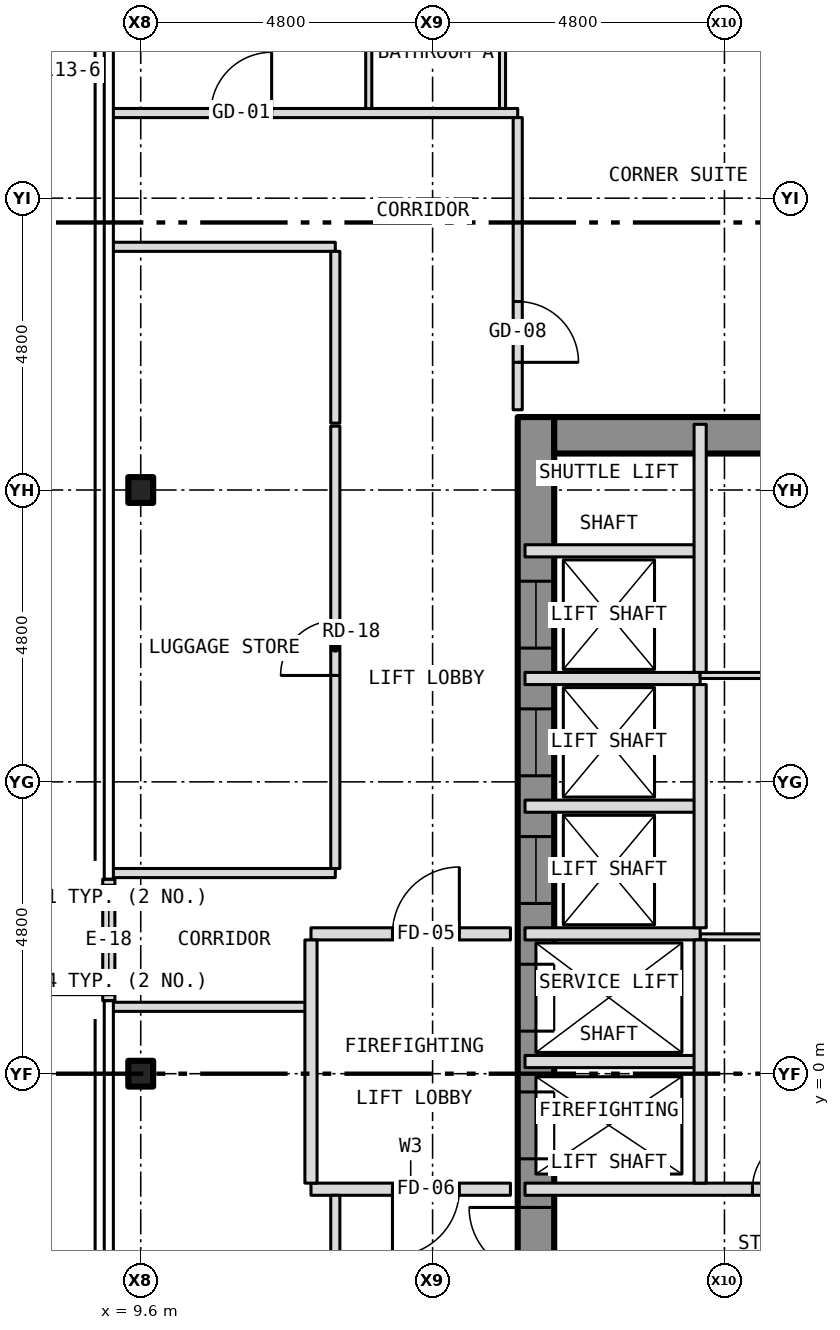
"""IFC4 building model, lengths in metres.
Left out: names, types, materials, properties, quantities, classifications, styles, units other than length and angle.
Written with IfcOpenShell. Run it as: python <this file> out.ifc"""

import sys

from ifc_helpers import new_model, si_unit, direction, frame, frame_2d, origin, origin_2d, place, context, subcontext, project, spatial, rectangle, i_section, extrude, element, fill, save


model = new_model("IFC4")
c1 = context("Model", 3, precision=1e-05, world=origin(), true_north=direction((0.0, 1.0)))
c2 = subcontext(c1, "Body", "Model", "MODEL_VIEW")
j1 = project(units=[si_unit("LENGTHUNIT", "METRE"), si_unit("PLANEANGLEUNIT", "RADIAN")], contexts=[c1])
p1 = place(None, origin())
s1 = spatial("IfcSite", under=j1, at=p1, CompositionType="ELEMENT")
p2 = place(p1, origin())
s2 = spatial("IfcBuilding", under=s1, at=p2, CompositionType="ELEMENT")
p3 = place(p2, frame((0.0, 0.0, 60.0)))
s3 = spatial("IfcBuildingStorey", under=s2, at=p3, CompositionType="ELEMENT", Elevation=60.0)
for number, where, z_axis, x_axis in (
    (1, (9.6, 0.0, -0.15), (0.0, 0.0, 1.0), (1.0, 0.0, 0.0)),
    (2, (9.6, 9.6, -0.15), (0.0, 0.0, 1.0), (1.0, 0.0, 0.0)),
):
    element("IfcColumn", number, at=place(p3, frame(where, z_axis=z_axis, x_axis=x_axis)), inside=s3, PredefinedType="COLUMN", context=c2, shape_type="SweptSolid", body=[
        extrude(i_section(OverallWidth=0.409, OverallDepth=0.424, WebThickness=0.033, FlangeThickness=0.052, at=origin_2d()), origin(), (0.0, 0.0, 1.0), 3.5),
    ])
p4 = place(p3, frame((16.1, -10.8, 0.0), z_axis=(0.0, 0.0, 1.0), x_axis=(0.0, 1.0, 0.0)))
e3 = element("IfcWall", 3, at=p4, inside=s3, PredefinedType="SHEAR", context=c2, shape_type="SweptSolid", body=[
    extrude(rectangle(XDim=21.6, YDim=0.6, at=frame_2d((10.8, 0.0))), origin(), (0.0, 0.0, 1.0), 3.25),
])
p5 = place(p4, frame((9.4, 0.0, 0.0)))
e4 = element("IfcOpeningElement", 4, at=p5, cuts=e3, PredefinedType="OPENING", context=c2, shape_type="SweptSolid", body=[
    extrude(rectangle(XDim=1.1, YDim=2.1, at=frame_2d((0.55, 1.05))), frame((0.0, 0.312, 0.0), z_axis=(0.0, -1.0, 0.0), x_axis=(1.0, 0.0, 0.0)), (0.0, 0.0, 1.0), 0.624),
])
p6 = place(p4, frame((11.5, 0.0, 0.0)))
e5 = element("IfcOpeningElement", 5, at=p6, cuts=e3, PredefinedType="OPENING", context=c2, shape_type="SweptSolid", body=[
    extrude(rectangle(XDim=1.1, YDim=2.1, at=frame_2d((0.55, 1.05))), frame((0.0, 0.312, 0.0), z_axis=(0.0, -1.0, 0.0), x_axis=(1.0, 0.0, 0.0)), (0.0, 0.0, 1.0), 0.624),
])
p7 = place(p4, frame((13.6, 0.0, 0.0)))
e6 = element("IfcOpeningElement", 6, at=p7, cuts=e3, PredefinedType="OPENING", context=c2, shape_type="SweptSolid", body=[
    extrude(rectangle(XDim=1.1, YDim=2.1, at=frame_2d((0.55, 1.05))), frame((0.0, 0.312, 0.0), z_axis=(0.0, -1.0, 0.0), x_axis=(1.0, 0.0, 0.0)), (0.0, 0.0, 1.0), 0.624),
])
p8 = place(p4, frame((15.7, 0.0, 0.0)))
e7 = element("IfcOpeningElement", 7, at=p8, cuts=e3, PredefinedType="OPENING", context=c2, shape_type="SweptSolid", body=[
    extrude(rectangle(XDim=1.1, YDim=2.1, at=frame_2d((0.55, 1.05))), frame((0.0, 0.312, 0.0), z_axis=(0.0, -1.0, 0.0), x_axis=(1.0, 0.0, 0.0)), (0.0, 0.0, 1.0), 0.624),
])
p9 = place(p4, frame((17.8, 0.0, 0.0)))
e8 = element("IfcOpeningElement", 8, at=p9, cuts=e3, PredefinedType="OPENING", context=c2, shape_type="SweptSolid", body=[
    extrude(rectangle(XDim=1.1, YDim=2.1, at=frame_2d((0.55, 1.05))), frame((0.0, 0.312, 0.0), z_axis=(0.0, -1.0, 0.0), x_axis=(1.0, 0.0, 0.0)), (0.0, 0.0, 1.0), 0.624),
])
p10 = place(p4, frame((5.642, 0.0, 0.0)))
e9 = element("IfcOpeningElement", 9, at=p10, cuts=e3, PredefinedType="OPENING", context=c2, shape_type="SweptSolid", body=[
    extrude(rectangle(XDim=1.1, YDim=2.1, at=frame_2d((0.55, 1.05))), frame((0.0, 0.312, 0.0), z_axis=(0.0, -1.0, 0.0), x_axis=(1.0, 0.0, 0.0)), (0.0, 0.0, 1.0), 0.624),
])
p11 = place(p4, frame((7.5, 0.0, 0.0)))
e10 = element("IfcOpeningElement", 10, at=p11, cuts=e3, PredefinedType="OPENING", context=c2, shape_type="SweptSolid", body=[
    extrude(rectangle(XDim=1.1, YDim=2.1, at=frame_2d((0.55, 1.05))), frame((0.0, 0.312, 0.0), z_axis=(0.0, -1.0, 0.0), x_axis=(1.0, 0.0, 0.0)), (0.0, 0.0, 1.0), 0.624),
])
p12 = place(p3, frame((16.4, 10.5, 0.0), z_axis=(0.0, 0.0, 1.0), x_axis=(1.0, 0.0, 0.0)))
e11 = element("IfcWall", 11, at=p12, inside=s3, PredefinedType="SHEAR", context=c2, shape_type="SweptSolid", body=[
    extrude(rectangle(XDim=7.0, YDim=0.6, at=frame_2d((3.5, 0.0))), origin(), (0.0, 0.0, 1.0), 3.25),
])
p13 = place(p3, frame((9.075, 1.2, 0.0), z_axis=(0.0, 0.0, 1.0), x_axis=(0.0, 1.0, 0.0)))
e12 = element("IfcWall", 12, at=p13, inside=s3, PredefinedType="SOLIDWALL", context=c2, shape_type="SweptSolid", body=[
    extrude(rectangle(XDim=2.0, YDim=0.2, at=frame_2d((1.0, 0.0))), origin(), (0.0, 0.0, 1.0), 2.593),
])
p14 = place(p13, frame((0.1, 0.0, 0.0)))
e13 = element("IfcOpeningElement", 13, at=p14, cuts=e12, PredefinedType="OPENING", context=c2, shape_type="SweptSolid", body=[
    extrude(rectangle(XDim=1.8, YDim=2.1, at=frame_2d((0.9, 1.05))), frame((0.0, 0.112, 0.0), z_axis=(0.0, -1.0, 0.0), x_axis=(1.0, 0.0, 0.0)), (0.0, 0.0, 1.0), 0.224),
])
p15 = place(p3, frame((12.4, -1.9, 0.0), z_axis=(0.0, 0.0, 1.0), x_axis=(1.0, 0.0, 0.0)))
e14 = element("IfcWall", 14, at=p15, inside=s3, PredefinedType="PARTITIONING", context=c2, shape_type="SweptSolid", body=[
    extrude(rectangle(XDim=3.28, YDim=0.2, at=frame_2d((1.64, 0.0))), origin(), (0.0, 0.0, 1.0), 3.35),
])
p16 = place(p15, frame((1.34, 0.0, 0.0)))
e15 = element("IfcOpeningElement", 15, at=p16, cuts=e14, PredefinedType="OPENING", context=c2, shape_type="SweptSolid", body=[
    extrude(rectangle(XDim=1.1, YDim=2.1, at=frame_2d((0.55, 1.05))), frame((0.0, 0.112, 0.0), z_axis=(0.0, -1.0, 0.0), x_axis=(1.0, 0.0, 0.0)), (0.0, 0.0, 1.0), 0.224),
])
p17 = place(p3, frame((15.92, -1.9, 0.0), z_axis=(0.0, 0.0, 1.0), x_axis=(1.0, 0.0, 0.0)))
e16 = element("IfcWall", 16, at=p17, inside=s3, PredefinedType="PARTITIONING", context=c2, shape_type="SweptSolid", body=[
    extrude(rectangle(XDim=7.96, YDim=0.2, at=frame_2d((3.98, 0.0))), origin(), (0.0, 0.0, 1.0), 3.25),
])
p18 = place(p17, frame((3.74, 0.0, 0.0)))
e17 = element("IfcOpeningElement", 17, at=p18, cuts=e16, PredefinedType="OPENING", context=c2, shape_type="SweptSolid", body=[
    extrude(rectangle(XDim=0.9, YDim=2.1, at=frame_2d((0.45, 1.05))), frame((0.0, 0.112, 0.0), z_axis=(0.0, -1.0, 0.0), x_axis=(1.0, 0.0, 0.0)), (0.0, 0.0, 1.0), 0.224),
])
p19 = place(p3, frame((15.92, 0.2, 0.0), z_axis=(0.0, 0.0, 1.0), x_axis=(1.0, 0.0, 0.0)))
e18 = element("IfcWall", 18, at=p19, inside=s3, PredefinedType="PARTITIONING", context=c2, shape_type="SweptSolid", body=[
    extrude(rectangle(XDim=2.88, YDim=0.2, at=frame_2d((1.44, 0.0))), origin(), (0.0, 0.0, 1.0), 3.25),
])
p20 = place(p3, frame((9.12, 1.1, 0.0), z_axis=(0.0, 0.0, 1.0), x_axis=(1.0, 0.0, 0.0)))
e19 = element("IfcWall", 19, at=p20, inside=s3, PredefinedType="PARTITIONING", context=c2, shape_type="SweptSolid", body=[
    extrude(rectangle(XDim=3.28, YDim=0.15, at=frame_2d((1.64, 0.0))), origin(), (0.0, 0.0, 1.0), 3.35),
])
p21 = place(p3, frame((18.8, 2.25, 0.0), z_axis=(0.0, 0.0, 1.0), x_axis=(1.0, 0.0, 0.0)))
e20 = element("IfcWall", 20, at=p21, inside=s3, PredefinedType="PARTITIONING", context=c2, shape_type="SweptSolid", body=[
    extrude(rectangle(XDim=5.08, YDim=0.1, at=frame_2d((2.54, 0.0))), origin(), (0.0, 0.0, 1.0), 3.25),
])
p22 = place(p21, frame((2.15, 0.0, 0.0)))
e21 = element("IfcOpeningElement", 21, at=p22, cuts=e20, PredefinedType="OPENING", context=c2, shape_type="SweptSolid", body=[
    extrude(rectangle(XDim=0.9, YDim=2.1, at=frame_2d((0.45, 1.05))), frame((0.0, 0.062, 0.0), z_axis=(0.0, -1.0, 0.0), x_axis=(1.0, 0.0, 0.0)), (0.0, 0.0, 1.0), 0.124),
])
p23 = place(p3, frame((12.4, 2.3, 0.0), z_axis=(0.0, 0.0, 1.0), x_axis=(1.0, 0.0, 0.0)))
e22 = element("IfcWall", 22, at=p23, inside=s3, PredefinedType="PARTITIONING", context=c2, shape_type="SweptSolid", body=[
    extrude(rectangle(XDim=3.28, YDim=0.2, at=frame_2d((1.64, 0.0))), origin(), (0.0, 0.0, 1.0), 3.35),
])
p24 = place(p23, frame((1.34, 0.0, 0.0)))
e23 = element("IfcOpeningElement", 23, at=p24, cuts=e22, PredefinedType="OPENING", context=c2, shape_type="SweptSolid", body=[
    extrude(rectangle(XDim=1.1, YDim=2.1, at=frame_2d((0.55, 1.05))), frame((0.0, 0.112, 0.0), z_axis=(0.0, -1.0, 0.0), x_axis=(1.0, 0.0, 0.0)), (0.0, 0.0, 1.0), 0.224),
])
p25 = place(p3, frame((15.92, 2.3, 0.0), z_axis=(0.0, 0.0, 1.0), x_axis=(1.0, 0.0, 0.0)))
e24 = element("IfcWall", 24, at=p25, inside=s3, PredefinedType="PARTITIONING", context=c2, shape_type="SweptSolid", body=[
    extrude(rectangle(XDim=2.88, YDim=0.2, at=frame_2d((1.44, 0.0))), origin(), (0.0, 0.0, 1.0), 3.25),
])
p26 = place(p3, frame((9.12, 3.3, 0.0), z_axis=(0.0, 0.0, 1.0), x_axis=(1.0, 0.0, 0.0)))
e25 = element("IfcWall", 25, at=p26, inside=s3, PredefinedType="PARTITIONING", context=c2, shape_type="SweptSolid", body=[
    extrude(rectangle(XDim=3.68, YDim=0.15, at=frame_2d((1.84, 0.0))), origin(), (0.0, 0.0, 1.0), 3.35),
])
for number, where, z_axis, x_axis in (
    (26, (15.92, 4.4, 0.0), (0.0, 0.0, 1.0), (1.0, 0.0, 0.0)),
    (27, (15.92, 6.5, 0.0), (0.0, 0.0, 1.0), (1.0, 0.0, 0.0)),
):
    element("IfcWall", number, at=place(p3, frame(where, z_axis=z_axis, x_axis=x_axis)), inside=s3, PredefinedType="PARTITIONING", context=c2, shape_type="SweptSolid", body=[
        extrude(rectangle(XDim=2.88, YDim=0.2, at=frame_2d((1.44, 0.0))), origin(), (0.0, 0.0, 1.0), 3.25),
    ])
p27 = place(p3, frame((18.8, 6.55, 0.0), z_axis=(0.0, 0.0, 1.0), x_axis=(1.0, 0.0, 0.0)))
e28 = element("IfcWall", 28, at=p27, inside=s3, PredefinedType="PARTITIONING", context=c2, shape_type="SweptSolid", body=[
    extrude(rectangle(XDim=5.08, YDim=0.1, at=frame_2d((2.54, 0.0))), origin(), (0.0, 0.0, 1.0), 3.25),
])
p28 = place(p27, frame((2.15, 0.0, 0.0)))
e29 = element("IfcOpeningElement", 29, at=p28, cuts=e28, PredefinedType="OPENING", context=c2, shape_type="SweptSolid", body=[
    extrude(rectangle(XDim=0.9, YDim=2.1, at=frame_2d((0.45, 1.05))), frame((0.0, 0.062, 0.0), z_axis=(0.0, -1.0, 0.0), x_axis=(1.0, 0.0, 0.0)), (0.0, 0.0, 1.0), 0.124),
])
p29 = place(p3, frame((15.92, 8.6, 0.0), z_axis=(0.0, 0.0, 1.0), x_axis=(1.0, 0.0, 0.0)))
e30 = element("IfcWall", 30, at=p29, inside=s3, PredefinedType="PARTITIONING", context=c2, shape_type="SweptSolid", body=[
    extrude(rectangle(XDim=2.88, YDim=0.2, at=frame_2d((1.44, 0.0))), origin(), (0.0, 0.0, 1.0), 3.25),
])
p30 = place(p3, frame((9.12, 13.6, 0.0), z_axis=(0.0, 0.0, 1.0), x_axis=(1.0, 0.0, 0.0)))
e31 = element("IfcWall", 31, at=p30, inside=s3, PredefinedType="PARTITIONING", context=c2, shape_type="SweptSolid", body=[
    extrude(rectangle(XDim=3.68, YDim=0.15, at=frame_2d((1.84, 0.0))), origin(), (0.0, 0.0, 1.0), 3.35),
])
p31 = place(p3, frame((9.12, 15.8, 0.0), z_axis=(0.0, 0.0, 1.0), x_axis=(1.0, 0.0, 0.0)))
e32 = element("IfcWall", 32, at=p31, inside=s3, PredefinedType="PARTITIONING", context=c2, shape_type="SweptSolid", body=[
    extrude(rectangle(XDim=6.68, YDim=0.15, at=frame_2d((3.34, 0.0))), origin(), (0.0, 0.0, 1.0), 3.35),
])
p32 = place(p31, frame((1.633, 0.0, 0.0)))
e33 = element("IfcOpeningElement", 33, at=p32, cuts=e32, PredefinedType="OPENING", context=c2, shape_type="SweptSolid", body=[
    extrude(rectangle(XDim=1.0, YDim=2.1, at=frame_2d((0.5, 1.05))), frame((0.0, 0.087, 0.0), z_axis=(0.0, -1.0, 0.0), x_axis=(1.0, 0.0, 0.0)), (0.0, 0.0, 1.0), 0.174),
])
p33 = place(p3, frame((12.4, -1.8, 0.0), z_axis=(0.0, 0.0, 1.0), x_axis=(0.0, 1.0, 0.0)))
e34 = element("IfcWall", 34, at=p33, inside=s3, PredefinedType="PARTITIONING", context=c2, shape_type="SweptSolid", body=[
    extrude(rectangle(XDim=4.0, YDim=0.2, at=frame_2d((2.0, 0.0))), origin(), (0.0, 0.0, 1.0), 3.35),
])
p34 = place(p3, frame((12.8, -13.525, 0.0), z_axis=(0.0, 0.0, 1.0), x_axis=(0.0, 1.0, 0.0)))
e35 = element("IfcWall", 35, at=p34, inside=s3, PredefinedType="PARTITIONING", context=c2, shape_type="SweptSolid", body=[
    extrude(rectangle(XDim=11.525, YDim=0.15, at=frame_2d((5.762, 0.0))), origin(), (0.0, 0.0, 1.0), 3.35),
])
p35 = place(p34, frame((0.875, 0.0, 0.0)))
e36 = element("IfcOpeningElement", 36, at=p35, cuts=e35, PredefinedType="OPENING", context=c2, shape_type="SweptSolid", body=[
    extrude(rectangle(XDim=0.9, YDim=2.1, at=frame_2d((0.45, 1.05))), frame((0.0, 0.087, 0.0), z_axis=(0.0, -1.0, 0.0), x_axis=(1.0, 0.0, 0.0)), (0.0, 0.0, 1.0), 0.174),
])
p36 = place(p34, frame((7.325, 0.0, 0.0)))
e37 = element("IfcOpeningElement", 37, at=p36, cuts=e35, PredefinedType="OPENING", context=c2, shape_type="SweptSolid", body=[
    extrude(rectangle(XDim=0.9, YDim=2.1, at=frame_2d((0.45, 1.05))), frame((0.0, 0.087, 0.0), z_axis=(0.0, -1.0, 0.0), x_axis=(1.0, 0.0, 0.0)), (0.0, 0.0, 1.0), 0.174),
])
p37 = place(p3, frame((12.8, 3.375, 0.0), z_axis=(0.0, 0.0, 1.0), x_axis=(0.0, 1.0, 0.0)))
e38 = element("IfcWall", 38, at=p37, inside=s3, PredefinedType="PARTITIONING", context=c2, shape_type="SweptSolid", body=[
    extrude(rectangle(XDim=7.275, YDim=0.15, at=frame_2d((3.637, 0.0))), origin(), (0.0, 0.0, 1.0), 3.35),
])
p38 = place(p37, frame((3.175, 0.0, 0.0)))
e39 = element("IfcOpeningElement", 39, at=p38, cuts=e38, PredefinedType="OPENING", context=c2, shape_type="SweptSolid", body=[
    extrude(rectangle(XDim=0.9, YDim=2.1, at=frame_2d((0.45, 1.05))), frame((0.0, 0.087, 0.0), z_axis=(0.0, -1.0, 0.0), x_axis=(1.0, 0.0, 0.0)), (0.0, 0.0, 1.0), 0.174),
])
p39 = place(p3, frame((12.8, 10.7, 0.0), z_axis=(0.0, 0.0, 1.0), x_axis=(0.0, 1.0, 0.0)))
e40 = element("IfcWall", 40, at=p39, inside=s3, PredefinedType="PARTITIONING", context=c2, shape_type="SweptSolid", body=[
    extrude(rectangle(XDim=2.825, YDim=0.15, at=frame_2d((1.413, 0.0))), origin(), (0.0, 0.0, 1.0), 3.35),
])
p40 = place(p3, frame((13.35, 15.875, 0.0), z_axis=(0.0, 0.0, 1.0), x_axis=(0.0, 1.0, 0.0)))
e41 = element("IfcWall", 41, at=p40, inside=s3, PredefinedType="PARTITIONING", context=c2, shape_type="SweptSolid", body=[
    extrude(rectangle(XDim=3.075, YDim=0.1, at=frame_2d((1.538, 0.0))), origin(), (0.0, 0.0, 1.0), 3.35),
])
p41 = place(p40, frame((1.971, 0.0, 0.0)))
e42 = element("IfcOpeningElement", 42, at=p41, cuts=e41, PredefinedType="OPENING", context=c2, shape_type="SweptSolid", body=[
    extrude(rectangle(XDim=0.9, YDim=2.1, at=frame_2d((0.45, 1.05))), frame((0.0, 0.062, 0.0), z_axis=(0.0, -1.0, 0.0), x_axis=(1.0, 0.0, 0.0)), (0.0, 0.0, 1.0), 0.124),
])
p42 = place(p3, frame((15.55, 15.875, 0.0), z_axis=(0.0, 0.0, 1.0), x_axis=(0.0, 1.0, 0.0)))
e43 = element("IfcWall", 43, at=p42, inside=s3, PredefinedType="PARTITIONING", context=c2, shape_type="SweptSolid", body=[
    extrude(rectangle(XDim=8.005, YDim=0.1, at=frame_2d((4.002, 0.0))), origin(), (0.0, 0.0, 1.0), 3.35),
])
p43 = place(p3, frame((15.8, 10.92, 0.0), z_axis=(0.0, 0.0, 1.0), x_axis=(0.0, 1.0, 0.0)))
e44 = element("IfcWall", 44, at=p43, inside=s3, PredefinedType="PARTITIONING", context=c2, shape_type="SweptSolid", body=[
    extrude(rectangle(XDim=4.805, YDim=0.15, at=frame_2d((2.403, 0.0))), origin(), (0.0, 0.0, 1.0), 3.35),
])
p44 = place(p43, frame((0.78, 0.0, 0.0)))
e45 = element("IfcOpeningElement", 45, at=p44, cuts=e44, PredefinedType="OPENING", context=c2, shape_type="SweptSolid", body=[
    extrude(rectangle(XDim=1.0, YDim=2.1, at=frame_2d((0.5, 1.05))), frame((0.0, 0.087, 0.0), z_axis=(0.0, -1.0, 0.0), x_axis=(1.0, 0.0, 0.0)), (0.0, 0.0, 1.0), 0.174),
])
for number, where, z_axis, x_axis in (
    (46, (18.8, -1.8, 0.0), (0.0, 0.0, 1.0), (0.0, 1.0, 0.0)),
    (47, (18.8, 2.4, 0.0), (0.0, 0.0, 1.0), (0.0, 1.0, 0.0)),
):
    element("IfcWall", number, at=place(p3, frame(where, z_axis=z_axis, x_axis=x_axis)), inside=s3, PredefinedType="PARTITIONING", context=c2, shape_type="SweptSolid", body=[
        extrude(rectangle(XDim=4.0, YDim=0.2, at=frame_2d((2.0, 0.0))), origin(), (0.0, 0.0, 1.0), 3.25),
    ])
p45 = place(p3, frame((18.8, 6.6, 0.0), z_axis=(0.0, 0.0, 1.0), x_axis=(0.0, 1.0, 0.0)))
e48 = element("IfcWall", 48, at=p45, inside=s3, PredefinedType="PARTITIONING", context=c2, shape_type="SweptSolid", body=[
    extrude(rectangle(XDim=4.08, YDim=0.2, at=frame_2d((2.04, 0.0))), origin(), (0.0, 0.0, 1.0), 3.25),
])
p46 = place(p14, origin())
e49 = element("IfcDoor", 49, at=p46, inside=s3, OperationType="DOUBLE_DOOR_DOUBLE_SWING", PredefinedType="DOOR", context=c2, shape_type="SweptSolid", body=[
    extrude(rectangle(XDim=1.8, YDim=2.1, at=frame_2d((0.9, 1.05))), frame((0.0, 0.025, 0.0), z_axis=(0.0, -1.0, 0.0), x_axis=(1.0, 0.0, 0.0)), (0.0, 0.0, 1.0), 0.05),
])
fill(e13, e49)
p47 = place(p5, origin())
e50 = element("IfcDoor", 50, at=p47, inside=s3, OperationType="SLIDING_TO_LEFT", PredefinedType="DOOR", context=c2, shape_type="SweptSolid", body=[
    extrude(rectangle(XDim=1.1, YDim=2.1, at=frame_2d((0.55, 1.05))), frame((0.0, 0.025, 0.0), z_axis=(0.0, -1.0, 0.0), x_axis=(1.0, 0.0, 0.0)), (0.0, 0.0, 1.0), 0.05),
])
fill(e4, e50)
p48 = place(p6, origin())
e51 = element("IfcDoor", 51, at=p48, inside=s3, OperationType="SLIDING_TO_LEFT", PredefinedType="DOOR", context=c2, shape_type="SweptSolid", body=[
    extrude(rectangle(XDim=1.1, YDim=2.1, at=frame_2d((0.55, 1.05))), frame((0.0, 0.025, 0.0), z_axis=(0.0, -1.0, 0.0), x_axis=(1.0, 0.0, 0.0)), (0.0, 0.0, 1.0), 0.05),
])
fill(e5, e51)
p49 = place(p7, origin())
e52 = element("IfcDoor", 52, at=p49, inside=s3, OperationType="SLIDING_TO_LEFT", PredefinedType="DOOR", context=c2, shape_type="SweptSolid", body=[
    extrude(rectangle(XDim=1.1, YDim=2.1, at=frame_2d((0.55, 1.05))), frame((0.0, 0.025, 0.0), z_axis=(0.0, -1.0, 0.0), x_axis=(1.0, 0.0, 0.0)), (0.0, 0.0, 1.0), 0.05),
])
fill(e6, e52)
p50 = place(p8, origin())
e53 = element("IfcDoor", 53, at=p50, inside=s3, OperationType="SLIDING_TO_LEFT", PredefinedType="DOOR", context=c2, shape_type="SweptSolid", body=[
    extrude(rectangle(XDim=1.1, YDim=2.1, at=frame_2d((0.55, 1.05))), frame((0.0, 0.025, 0.0), z_axis=(0.0, -1.0, 0.0), x_axis=(1.0, 0.0, 0.0)), (0.0, 0.0, 1.0), 0.05),
])
fill(e7, e53)
p51 = place(p9, origin())
e54 = element("IfcDoor", 54, at=p51, inside=s3, OperationType="SLIDING_TO_LEFT", PredefinedType="DOOR", context=c2, shape_type="SweptSolid", body=[
    extrude(rectangle(XDim=1.1, YDim=2.1, at=frame_2d((0.55, 1.05))), frame((0.0, 0.025, 0.0), z_axis=(0.0, -1.0, 0.0), x_axis=(1.0, 0.0, 0.0)), (0.0, 0.0, 1.0), 0.05),
])
fill(e8, e54)
p52 = place(p11, origin())
e55 = element("IfcDoor", 55, at=p52, inside=s3, OperationType="SINGLE_SWING_RIGHT", PredefinedType="DOOR", context=c2, shape_type="SweptSolid", body=[
    extrude(rectangle(XDim=1.1, YDim=2.1, at=frame_2d((0.55, 1.05))), frame((0.0, 0.025, 0.0), z_axis=(0.0, -1.0, 0.0), x_axis=(1.0, 0.0, 0.0)), (0.0, 0.0, 1.0), 0.05),
])
fill(e10, e55)
p53 = place(p18, origin())
e56 = element("IfcDoor", 56, at=p53, inside=s3, OperationType="SINGLE_SWING_RIGHT", PredefinedType="DOOR", context=c2, shape_type="SweptSolid", body=[
    extrude(rectangle(XDim=0.9, YDim=2.1, at=frame_2d((0.45, 1.05))), frame((0.0, 0.025, 0.0), z_axis=(0.0, -1.0, 0.0), x_axis=(1.0, 0.0, 0.0)), (0.0, 0.0, 1.0), 0.05),
])
fill(e17, e56)
p54 = place(p24, origin())
e57 = element("IfcDoor", 57, at=p54, inside=s3, OperationType="SINGLE_SWING_RIGHT", PredefinedType="DOOR", context=c2, shape_type="SweptSolid", body=[
    extrude(rectangle(XDim=1.1, YDim=2.1, at=frame_2d((0.55, 1.05))), frame((0.0, 0.025, 0.0), z_axis=(0.0, -1.0, 0.0), x_axis=(1.0, 0.0, 0.0)), (0.0, 0.0, 1.0), 0.05),
])
fill(e23, e57)
p55 = place(p16, origin())
e58 = element("IfcDoor", 58, at=p55, inside=s3, OperationType="SINGLE_SWING_LEFT", PredefinedType="DOOR", context=c2, shape_type="SweptSolid", body=[
    extrude(rectangle(XDim=1.1, YDim=2.1, at=frame_2d((0.55, 1.05))), frame((0.0, 0.025, 0.0), z_axis=(0.0, -1.0, 0.0), x_axis=(1.0, 0.0, 0.0)), (0.0, 0.0, 1.0), 0.05),
])
fill(e15, e58)
p56 = place(p32, origin())
e59 = element("IfcDoor", 59, at=p56, inside=s3, OperationType="SINGLE_SWING_RIGHT", PredefinedType="DOOR", context=c2, shape_type="SweptSolid", body=[
    extrude(rectangle(XDim=1.0, YDim=2.1, at=frame_2d((0.5, 1.05))), frame((0.0, 0.025, 0.0), z_axis=(0.0, -1.0, 0.0), x_axis=(1.0, 0.0, 0.0)), (0.0, 0.0, 1.0), 0.05),
])
fill(e33, e59)
p57 = place(p44, origin())
e60 = element("IfcDoor", 60, at=p57, inside=s3, OperationType="SINGLE_SWING_LEFT", PredefinedType="DOOR", context=c2, shape_type="SweptSolid", body=[
    extrude(rectangle(XDim=1.0, YDim=2.1, at=frame_2d((0.5, 1.05))), frame((0.0, 0.025, 0.0), z_axis=(0.0, -1.0, 0.0), x_axis=(1.0, 0.0, 0.0)), (0.0, 0.0, 1.0), 0.05),
])
fill(e45, e60)
p58 = place(p38, origin())
e61 = element("IfcDoor", 61, at=p58, inside=s3, OperationType="SINGLE_SWING_LEFT", PredefinedType="DOOR", context=c2, shape_type="SweptSolid", body=[
    extrude(rectangle(XDim=0.9, YDim=2.1, at=frame_2d((0.45, 1.05))), frame((0.0, 0.025, 0.0), z_axis=(0.0, -1.0, 0.0), x_axis=(1.0, 0.0, 0.0)), (0.0, 0.0, 1.0), 0.05),
])
fill(e39, e61)
save(model, sys.argv[1])
